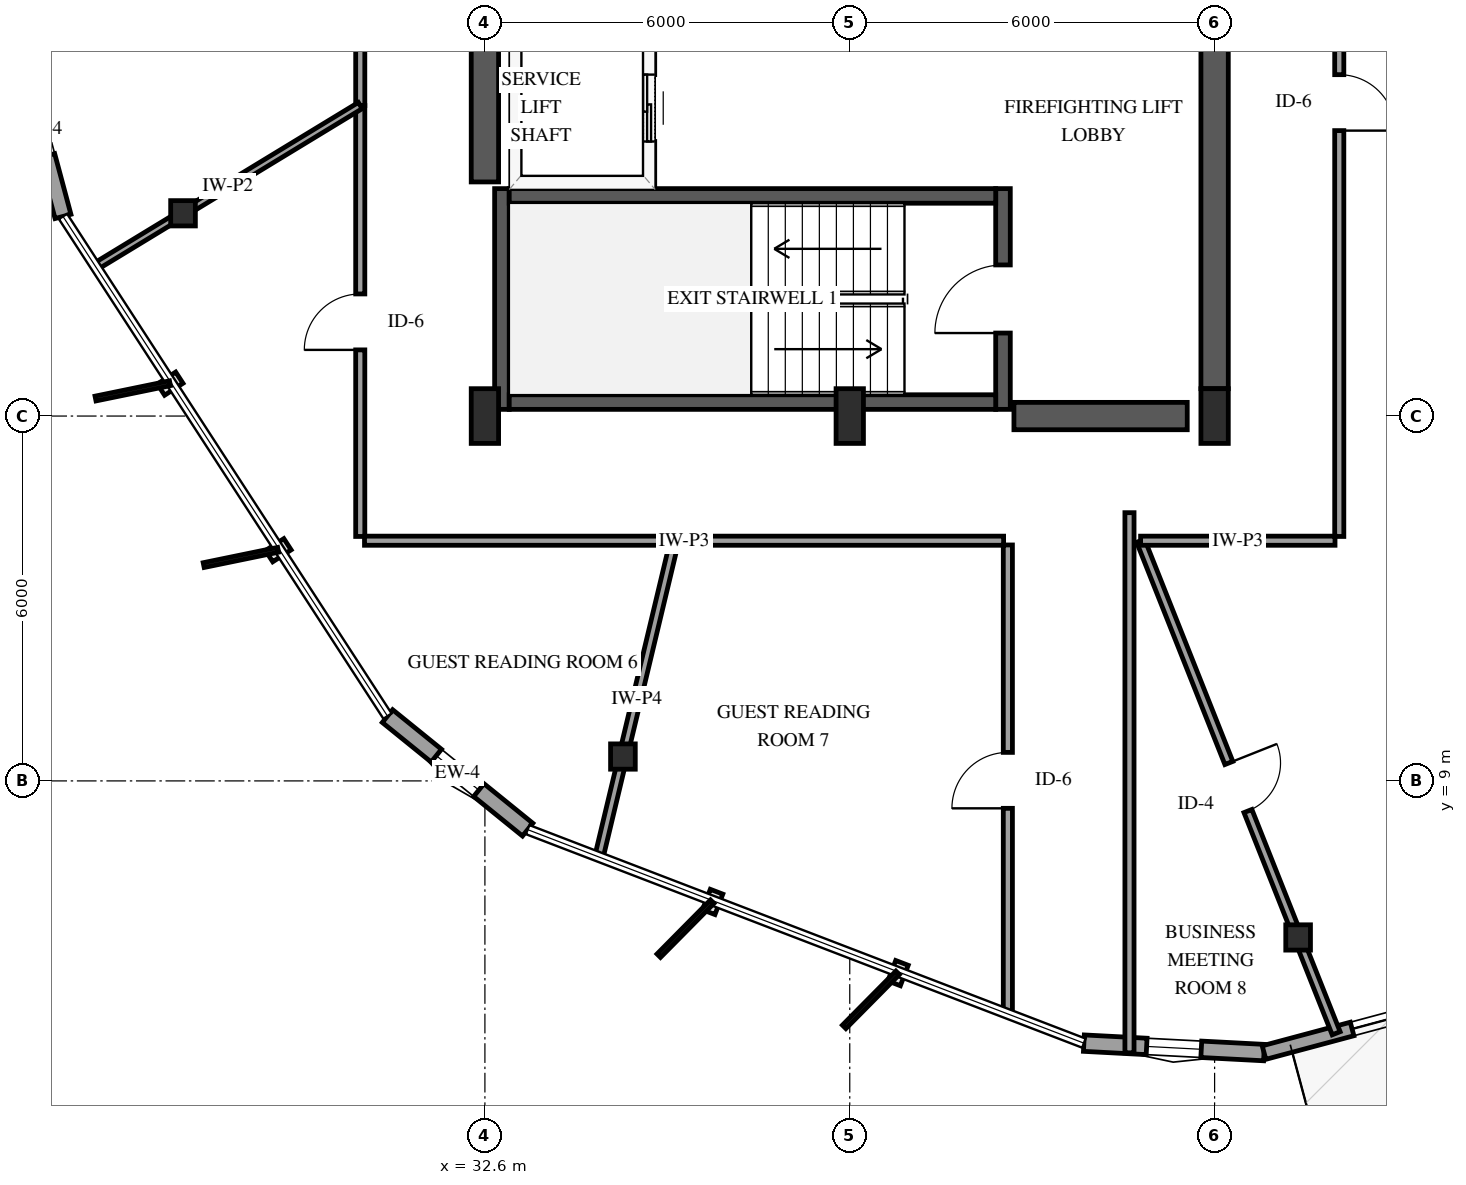
"""IFC4 building model, lengths in metres.
Left out: names, types, materials, properties, quantities, classifications, styles, units other than length and angle.
Written with IfcOpenShell. Run it as: python <this file> out.ifc"""

import sys

from ifc_helpers import new_model, si_unit, direction, frame, frame_2d, origin, origin_2d, place, context, subcontext, project, spatial, rectangle, i_section, extrude, element, fill, save


model = new_model("IFC4")
c1 = context("Model", 3, precision=1e-05, world=origin(), true_north=direction((0.0, 1.0)))
c2 = subcontext(c1, "Body", "Model", "MODEL_VIEW")
j1 = project(units=[si_unit("LENGTHUNIT", "METRE"), si_unit("PLANEANGLEUNIT", "RADIAN")], contexts=[c1])
p1 = place(None, origin())
s1 = spatial("IfcSite", under=j1, at=p1, CompositionType="ELEMENT")
p2 = place(p1, origin())
s2 = spatial("IfcBuilding", under=s1, at=p2, CompositionType="ELEMENT")
p3 = place(p2, frame((0.0, 0.0, 219.4)))
s3 = spatial("IfcBuildingStorey", under=s2, at=p3, CompositionType="ELEMENT", Elevation=219.4)
p4 = place(p3, frame((32.88, 15.11, 0.0), z_axis=(0.0, 0.0, 1.0), x_axis=(0.0, 1.0, 0.0)))
e1 = element("IfcWall", 1, at=p4, inside=s3, PredefinedType="SHEAR", context=c2, shape_type="SweptSolid", body=[
    extrude(rectangle(XDim=3.63, YDim=0.24, at=frame_2d((1.815, 0.0))), origin(), (0.0, 0.0, 1.0), 3.6),
])
p5 = place(p3, frame((41.12, 15.11, 0.0), z_axis=(0.0, 0.0, 1.0), x_axis=(0.0, 1.0, 0.0)))
e2 = element("IfcWall", 2, at=p5, inside=s3, PredefinedType="SHEAR", context=c2, shape_type="SweptSolid", body=[
    extrude(rectangle(XDim=3.63, YDim=0.24, at=frame_2d((1.815, 0.0))), origin(), (0.0, 0.0, 1.0), 3.6),
])
p6 = place(p5, frame((1.255, 0.0, 0.0)))
e3 = element("IfcOpeningElement", 3, at=p6, cuts=e2, PredefinedType="OPENING", context=c2, shape_type="SweptSolid", body=[
    extrude(rectangle(XDim=1.12, YDim=2.15, at=frame_2d((0.56, 1.075))), frame((0.0, 0.13, 0.0), z_axis=(0.0, -1.0, 0.0), x_axis=(1.0, 0.0, 0.0)), (0.0, 0.0, 1.0), 0.26),
])
for number, where, z_axis, x_axis in (
    (4, (33.0, 15.23, 0.0), (0.0, 0.0, 1.0), (1.0, 0.0, 0.0)),
    (5, (33.0, 18.62, 0.0), (0.0, 0.0, 1.0), (1.0, 0.0, 0.0)),
):
    element("IfcWall", number, at=place(p3, frame(where, z_axis=z_axis, x_axis=x_axis)), inside=s3, PredefinedType="SHEAR", context=c2, shape_type="SweptSolid", body=[
        extrude(rectangle(XDim=8.0, YDim=0.24, at=frame_2d((4.0, 0.0))), origin(), (0.0, 0.0, 1.0), 3.6),
    ])
p7 = place(p3, frame((32.6, 18.85, 0.0), z_axis=(0.0, 0.0, 1.0), x_axis=(0.0, 1.0, 0.0)))
e6 = element("IfcWall", 6, at=p7, inside=s3, PredefinedType="SHEAR", context=c2, shape_type="SweptSolid", body=[
    extrude(rectangle(XDim=12.3, YDim=0.45, at=frame_2d((6.15, 0.0))), origin(), (0.0, 0.0, 1.0), 3.6),
])
p8 = place(p3, frame((41.3, 15.0, 0.0), z_axis=(0.0, 0.0, 1.0), x_axis=(1.0, 0.0, 0.0)))
e7 = element("IfcWall", 7, at=p8, inside=s3, PredefinedType="SHEAR", context=c2, shape_type="SweptSolid", body=[
    extrude(rectangle(XDim=2.85, YDim=0.45, at=frame_2d((1.425, 0.0))), origin(), (0.0, 0.0, 1.0), 3.6),
])
p9 = place(p3, frame((44.6, 15.45, 0.0), z_axis=(0.0, 0.0, 1.0), x_axis=(0.0, 1.0, 0.0)))
e8 = element("IfcWall", 8, at=p9, inside=s3, PredefinedType="SHEAR", context=c2, shape_type="SweptSolid", body=[
    extrude(rectangle(XDim=6.35, YDim=0.45, at=frame_2d((3.175, 0.0))), origin(), (0.0, 0.0, 1.0), 3.6),
])
for number, where, z_axis, x_axis in (
    (9, (32.6, 15.0, 0.0), (0.0, 0.0, 1.0), (1.0, 0.0, 0.0)),
    (10, (38.6, 15.0, 0.0), (0.0, 0.0, 1.0), (1.0, 0.0, 0.0)),
    (11, (44.6, 15.0, 0.0), (0.0, 0.0, 1.0), (1.0, 0.0, 0.0)),
):
    element("IfcColumn", number, at=place(p3, frame(where, z_axis=z_axis, x_axis=x_axis)), inside=s3, PredefinedType="PILASTER", context=c2, shape_type="SweptSolid", body=[
        extrude(rectangle(XDim=0.45, YDim=0.9, at=origin_2d()), origin(), (0.0, 0.0, 1.0), 3.6),
    ])
for number, where, z_axis, x_axis in (
    (12, (27.635, 18.334, 0.0), (0.0, 0.0, 1.0), (1.0, 0.0, 0.0)),
    (13, (34.87, 9.401, 0.0), (0.0, 0.0, 1.0), (1.0, 0.0, 0.0)),
    (14, (45.973, 6.426, 0.0), (0.0, 0.0, 1.0), (1.0, 0.0, 0.0)),
):
    element("IfcColumn", number, at=place(p3, frame(where, z_axis=z_axis, x_axis=x_axis)), inside=s3, PredefinedType="COLUMN", context=c2, shape_type="SweptSolid", body=[
        extrude(i_section(OverallWidth=0.406, OverallDepth=0.416, WebThickness=0.03, FlangeThickness=0.048, FilletRadius=0.038, at=origin_2d()), origin(), (0.0, 0.0, 1.0), 3.6),
    ])
p10 = place(p3, frame((24.894, 21.148, 0.0), z_axis=(0.0, 0.0, 1.0), x_axis=(0.258825213075, -0.965924173565, 0.0)))
e15 = element("IfcWall", 15, at=p10, inside=s3, PredefinedType="SOLIDWALL", context=c2, shape_type="SweptSolid", body=[
    extrude(rectangle(XDim=2.967, YDim=0.27, at=frame_2d((1.483, 0.0))), origin(), (0.0, 0.0, 1.0), 2.679),
])
p11 = place(p10, frame((1.033, 0.0, 0.75)))
e16 = element("IfcOpeningElement", 16, at=p11, cuts=e15, PredefinedType="OPENING", context=c2, shape_type="SweptSolid", body=[
    extrude(rectangle(XDim=0.9, YDim=1.5, at=frame_2d((0.45, 0.75))), frame((0.0, 0.145, 0.0), z_axis=(0.0, -1.0, 0.0), x_axis=(1.0, 0.0, 0.0)), (0.0, 0.0, 1.0), 0.29),
])
p12 = place(p3, frame((30.998, 10.066, 0.0), z_axis=(0.0, 0.0, 1.0), x_axis=(0.777137534132, -0.629330797787, 0.0)))
e17 = element("IfcWall", 17, at=p12, inside=s3, PredefinedType="SOLIDWALL", context=c2, shape_type="SweptSolid", body=[
    extrude(rectangle(XDim=2.967, YDim=0.27, at=frame_2d((1.483, 0.0))), origin(), (0.0, 0.0, 1.0), 2.679),
])
p13 = place(p12, frame((1.033, 0.0, 0.75)))
e18 = element("IfcOpeningElement", 18, at=p13, cuts=e17, PredefinedType="OPENING", context=c2, shape_type="SweptSolid", body=[
    extrude(rectangle(XDim=0.9, YDim=1.5, at=frame_2d((0.45, 0.75))), frame((0.0, 0.145, 0.0), z_axis=(0.0, -1.0, 0.0), x_axis=(1.0, 0.0, 0.0)), (0.0, 0.0, 1.0), 0.29),
])
p14 = place(p3, frame((42.45, 4.688, 0.0), z_axis=(0.0, 0.0, 1.0), x_axis=(0.998629173391, -0.05234285102, 0.0)))
e19 = element("IfcWall", 19, at=p14, inside=s3, PredefinedType="SOLIDWALL", context=c2, shape_type="SweptSolid", body=[
    extrude(rectangle(XDim=2.967, YDim=0.27, at=frame_2d((1.483, 0.0))), origin(), (0.0, 0.0, 1.0), 2.679),
])
p15 = place(p14, frame((1.033, 0.0, 0.75)))
e20 = element("IfcOpeningElement", 20, at=p15, cuts=e19, PredefinedType="OPENING", context=c2, shape_type="SweptSolid", body=[
    extrude(rectangle(XDim=0.9, YDim=1.5, at=frame_2d((0.45, 0.75))), frame((0.0, 0.145, 0.0), z_axis=(0.0, -1.0, 0.0), x_axis=(1.0, 0.0, 0.0)), (0.0, 0.0, 1.0), 0.29),
])
p16 = place(p3, frame((45.413, 4.532, 0.0), z_axis=(0.0, 0.0, 1.0), x_axis=(0.965924471327, 0.258824101839, 0.0)))
e21 = element("IfcWall", 21, at=p16, inside=s3, PredefinedType="SOLIDWALL", context=c2, shape_type="SweptSolid", body=[
    extrude(rectangle(XDim=9.798, YDim=0.23, at=frame_2d((4.899, 0.0))), origin(), (0.0, 0.0, 1.0), 2.679),
])
p17 = place(p16, frame((4.399, 0.0, 0.0)))
e22 = element("IfcOpeningElement", 22, at=p17, cuts=e21, PredefinedType="OPENING", context=c2, shape_type="SweptSolid", body=[
    extrude(rectangle(XDim=1.0, YDim=2.15, at=frame_2d((0.5, 1.075))), frame((0.0, 0.125, 0.0), z_axis=(0.0, -1.0, 0.0), x_axis=(1.0, 0.0, 0.0)), (0.0, 0.0, 1.0), 0.25),
])
p18 = place(p16, frame((1.5, 0.0, 0.72)))
e23 = element("IfcOpeningElement", 23, at=p18, cuts=e21, PredefinedType="OPENING", context=c2, shape_type="SweptSolid", body=[
    extrude(rectangle(XDim=1.2, YDim=1.6, at=frame_2d((0.6, 0.8))), frame((0.0, 0.125, 0.0), z_axis=(0.0, -1.0, 0.0), x_axis=(1.0, 0.0, 0.0)), (0.0, 0.0, 1.0), 0.25),
])
p19 = place(p16, frame((6.039, 0.0, 0.72)))
e24 = element("IfcOpeningElement", 24, at=p19, cuts=e21, PredefinedType="OPENING", context=c2, shape_type="SweptSolid", body=[
    extrude(rectangle(XDim=1.2, YDim=1.6, at=frame_2d((0.6, 0.8))), frame((0.0, 0.125, 0.0), z_axis=(0.0, -1.0, 0.0), x_axis=(1.0, 0.0, 0.0)), (0.0, 0.0, 1.0), 0.25),
])
p20 = place(p3, frame((35.3, 18.79, 0.0), z_axis=(0.0, 0.0, 1.0), x_axis=(0.0, 1.0, 0.0)))
e25 = element("IfcWall", 25, at=p20, inside=s3, PredefinedType="SOLIDWALL", context=c2, shape_type="SweptSolid", body=[
    extrude(rectangle(XDim=2.55, YDim=0.185, at=frame_2d((1.275, 0.0))), origin(), (0.0, 0.0, 1.0), 3.3),
])
p21 = place(p20, frame((0.725, 0.0, 0.0)))
e26 = element("IfcOpeningElement", 26, at=p21, cuts=e25, PredefinedType="OPENING", context=c2, shape_type="SweptSolid", body=[
    extrude(rectangle(XDim=1.1, YDim=2.15, at=frame_2d((0.55, 1.075))), frame((0.0, 0.103, 0.0), z_axis=(0.0, -1.0, 0.0), x_axis=(1.0, 0.0, 0.0)), (0.0, 0.0, 1.0), 0.205),
])
p22 = place(p3, frame((46.65, 27.258, 0.0), z_axis=(0.0, 0.0, 1.0), x_axis=(0.0, -1.0, 0.0)))
e27 = element("IfcWall", 27, at=p22, inside=s3, PredefinedType="PARTITIONING", context=c2, shape_type="SweptSolid", body=[
    extrude(rectangle(XDim=14.238, YDim=0.15, at=frame_2d((7.119, 0.0))), origin(), (0.0, 0.0, 1.0), 3.3),
])
p23 = place(p22, frame((6.644, 0.0, 0.0)))
e28 = element("IfcOpeningElement", 28, at=p23, cuts=e27, PredefinedType="OPENING", context=c2, shape_type="SweptSolid", body=[
    extrude(rectangle(XDim=0.92, YDim=2.12, at=frame_2d((0.46, 1.06))), frame((0.0, 0.085, 0.0), z_axis=(0.0, -1.0, 0.0), x_axis=(1.0, 0.0, 0.0)), (0.0, 0.0, 1.0), 0.17),
])
p24 = place(p3, frame((43.383, 12.95, 0.0), z_axis=(0.0, 0.0, 1.0), x_axis=(0.369027609924, -0.929418432738, 0.0)))
e29 = element("IfcWall", 29, at=p24, inside=s3, PredefinedType="PARTITIONING", context=c2, shape_type="SweptSolid", body=[
    extrude(rectangle(XDim=8.715, YDim=0.14, at=frame_2d((4.357, 0.0))), origin(), (0.0, 0.0, 1.0), 2.595),
])
p25 = place(p24, frame((3.933, 0.0, 0.0)))
e30 = element("IfcOpeningElement", 30, at=p25, cuts=e29, PredefinedType="OPENING", context=c2, shape_type="SweptSolid", body=[
    extrude(rectangle(XDim=0.85, YDim=2.1, at=frame_2d((0.425, 1.05))), frame((0.0, 0.08, 0.0), z_axis=(0.0, -1.0, 0.0), x_axis=(1.0, 0.0, 0.0)), (0.0, 0.0, 1.0), 0.16),
])
p26 = place(p3, frame((30.55, 20.106, 0.0), z_axis=(0.0, 0.0, 1.0), x_axis=(0.0, 1.0, 0.0)))
e31 = element("IfcWall", 31, at=p26, inside=s3, PredefinedType="PARTITIONING", context=c2, shape_type="SweptSolid", body=[
    extrude(rectangle(XDim=8.245, YDim=0.15, at=frame_2d((4.123, 0.0))), origin(), (0.0, 0.0, 1.0), 3.3),
])
p27 = place(p26, frame((3.647, 0.0, 0.0)))
e32 = element("IfcOpeningElement", 32, at=p27, cuts=e31, PredefinedType="OPENING", context=c2, shape_type="SweptSolid", body=[
    extrude(rectangle(XDim=0.92, YDim=2.12, at=frame_2d((0.46, 1.06))), frame((0.0, 0.085, 0.0), z_axis=(0.0, -1.0, 0.0), x_axis=(1.0, 0.0, 0.0)), (0.0, 0.0, 1.0), 0.17),
])
p28 = place(p3, frame((41.2, 5.167, 0.0), z_axis=(0.0, 0.0, 1.0), x_axis=(0.0, 1.0, 0.0)))
e33 = element("IfcWall", 33, at=p28, inside=s3, PredefinedType="PARTITIONING", context=c2, shape_type="SweptSolid", body=[
    extrude(rectangle(XDim=7.713, YDim=0.15, at=frame_2d((3.856, 0.0))), origin(), (0.0, 0.0, 1.0), 3.3),
])
p29 = place(p28, frame((3.382, 0.0, 0.0)))
e34 = element("IfcOpeningElement", 34, at=p29, cuts=e33, PredefinedType="OPENING", context=c2, shape_type="SweptSolid", body=[
    extrude(rectangle(XDim=0.92, YDim=2.12, at=frame_2d((0.46, 1.06))), frame((0.0, 0.085, 0.0), z_axis=(0.0, -1.0, 0.0), x_axis=(1.0, 0.0, 0.0)), (0.0, 0.0, 1.0), 0.17),
])
p30 = place(p3, frame((30.55, 13.02, 0.0), z_axis=(0.0, 0.0, 1.0), x_axis=(0.0, 1.0, 0.0)))
e35 = element("IfcWall", 35, at=p30, inside=s3, PredefinedType="PARTITIONING", context=c2, shape_type="SweptSolid", body=[
    extrude(rectangle(XDim=7.086, YDim=0.15, at=frame_2d((3.543, 0.0))), origin(), (0.0, 0.0, 1.0), 3.3),
])
p31 = place(p30, frame((3.068, 0.0, 0.0)))
e36 = element("IfcOpeningElement", 36, at=p31, cuts=e35, PredefinedType="OPENING", context=c2, shape_type="SweptSolid", body=[
    extrude(rectangle(XDim=0.92, YDim=2.12, at=frame_2d((0.46, 1.06))), frame((0.0, 0.085, 0.0), z_axis=(0.0, -1.0, 0.0), x_axis=(1.0, 0.0, 0.0)), (0.0, 0.0, 1.0), 0.17),
])
p32 = place(p3, frame((41.13, 12.95, 0.0), z_axis=(0.0, 0.0, 1.0), x_axis=(-1.0, 0.0, 0.0)))
e37 = element("IfcWall", 37, at=p32, inside=s3, PredefinedType="PARTITIONING", context=c2, shape_type="SweptSolid", body=[
    extrude(rectangle(XDim=5.411, YDim=0.15, at=frame_2d((2.706, 0.0))), origin(), (0.0, 0.0, 1.0), 3.3),
])
p33 = place(p3, frame((35.719, 12.95, 0.0), z_axis=(0.0, 0.0, 1.0), x_axis=(-0.232607948604, -0.972570584712, 0.0)))
e38 = element("IfcWall", 38, at=p33, inside=s3, PredefinedType="PARTITIONING", context=c2, shape_type="SweptSolid", body=[
    extrude(rectangle(XDim=5.348, YDim=0.14, at=frame_2d((2.674, 0.0))), origin(), (0.0, 0.0, 1.0), 2.595),
])
p34 = place(p3, frame((35.719, 12.95, 0.0), z_axis=(0.0, 0.0, 1.0), x_axis=(-1.0, 0.0, 0.0)))
e39 = element("IfcWall", 39, at=p34, inside=s3, PredefinedType="PARTITIONING", context=c2, shape_type="SweptSolid", body=[
    extrude(rectangle(XDim=5.099, YDim=0.15, at=frame_2d((2.549, 0.0))), origin(), (0.0, 0.0, 1.0), 3.3),
])
p35 = place(p3, frame((30.55, 20.106, 0.0), z_axis=(0.0, 0.0, 1.0), x_axis=(-0.854485244393, -0.519475665566, 0.0)))
e40 = element("IfcWall", 40, at=p35, inside=s3, PredefinedType="PARTITIONING", context=c2, shape_type="SweptSolid", body=[
    extrude(rectangle(XDim=5.095, YDim=0.12, at=frame_2d((2.548, 0.0))), origin(), (0.0, 0.0, 1.0), 2.678),
])
p36 = place(p3, frame((46.58, 12.95, 0.0), z_axis=(0.0, 0.0, 1.0), x_axis=(-1.0, 0.0, 0.0)))
e41 = element("IfcWall", 41, at=p36, inside=s3, PredefinedType="PARTITIONING", context=c2, shape_type="SweptSolid", body=[
    extrude(rectangle(XDim=3.197, YDim=0.15, at=frame_2d((1.599, 0.0))), origin(), (0.0, 0.0, 1.0), 3.3),
])
p37 = place(p3, frame((43.2, 13.411, 0.0), z_axis=(0.0, 0.0, 1.0), x_axis=(0.0, -1.0, 0.0)))
e42 = element("IfcWall", 42, at=p37, inside=s3, PredefinedType="PARTITIONING", context=c2, shape_type="SweptSolid", body=[
    extrude(rectangle(XDim=8.883, YDim=0.15, at=frame_2d((4.441, 0.0))), origin(), (0.0, 0.0, 1.0), 3.3),
])
p38 = place(p13, origin())
e43 = element("IfcWindow", 43, at=p38, inside=s3, PartitioningType="SINGLE_PANEL", PredefinedType="WINDOW", context=c2, shape_type="SweptSolid", body=[
    extrude(rectangle(XDim=0.9, YDim=1.5, at=frame_2d((0.45, 0.75))), frame((0.0, 0.03, 0.0), z_axis=(0.0, -1.0, 0.0), x_axis=(1.0, 0.0, 0.0)), (0.0, 0.0, 1.0), 0.06),
])
fill(e18, e43)
p39 = place(p15, origin())
e44 = element("IfcWindow", 44, at=p39, inside=s3, PartitioningType="SINGLE_PANEL", PredefinedType="WINDOW", context=c2, shape_type="SweptSolid", body=[
    extrude(rectangle(XDim=0.9, YDim=1.5, at=frame_2d((0.45, 0.75))), frame((0.0, 0.03, 0.0), z_axis=(0.0, -1.0, 0.0), x_axis=(1.0, 0.0, 0.0)), (0.0, 0.0, 1.0), 0.06),
])
fill(e20, e44)
p40 = place(p18, origin())
e45 = element("IfcWindow", 45, at=p40, inside=s3, PartitioningType="SINGLE_PANEL", PredefinedType="WINDOW", context=c2, shape_type="SweptSolid", body=[
    extrude(rectangle(XDim=1.2, YDim=1.6, at=frame_2d((0.6, 0.8))), frame((0.0, 0.03, 0.0), z_axis=(0.0, -1.0, 0.0), x_axis=(1.0, 0.0, 0.0)), (0.0, 0.0, 1.0), 0.06),
])
fill(e23, e45)
p41 = place(p21, origin())
e46 = element("IfcDoor", 46, at=p41, inside=s3, OperationType="SLIDING_TO_LEFT", PredefinedType="DOOR", context=c2, shape_type="SweptSolid", body=[
    extrude(rectangle(XDim=1.1, YDim=2.15, at=frame_2d((0.55, 1.075))), frame((0.0, 0.025, 0.0), z_axis=(0.0, -1.0, 0.0), x_axis=(1.0, 0.0, 0.0)), (0.0, 0.0, 1.0), 0.05),
])
fill(e26, e46)
p42 = place(p6, origin())
e47 = element("IfcDoor", 47, at=p42, inside=s3, OperationType="SINGLE_SWING_LEFT", PredefinedType="DOOR", context=c2, shape_type="SweptSolid", body=[
    extrude(rectangle(XDim=1.12, YDim=2.15, at=frame_2d((0.56, 1.075))), frame((0.0, 0.025, 0.0), z_axis=(0.0, -1.0, 0.0), x_axis=(1.0, 0.0, 0.0)), (0.0, 0.0, 1.0), 0.05),
])
fill(e3, e47)
p43 = place(p23, origin())
e48 = element("IfcDoor", 48, at=p43, inside=s3, OperationType="SINGLE_SWING_RIGHT", PredefinedType="DOOR", context=c2, shape_type="SweptSolid", body=[
    extrude(rectangle(XDim=0.92, YDim=2.12, at=frame_2d((0.46, 1.06))), frame((0.0, 0.025, 0.0), z_axis=(0.0, -1.0, 0.0), x_axis=(1.0, 0.0, 0.0)), (0.0, 0.0, 1.0), 0.05),
])
fill(e28, e48)
p44 = place(p25, origin())
e49 = element("IfcDoor", 49, at=p44, inside=s3, OperationType="SINGLE_SWING_LEFT", PredefinedType="DOOR", context=c2, shape_type="SweptSolid", body=[
    extrude(rectangle(XDim=0.85, YDim=2.1, at=frame_2d((0.425, 1.05))), frame((0.0, 0.025, 0.0), z_axis=(0.0, -1.0, 0.0), x_axis=(1.0, 0.0, 0.0)), (0.0, 0.0, 1.0), 0.05),
])
fill(e30, e49)
p45 = place(p29, origin())
e50 = element("IfcDoor", 50, at=p45, inside=s3, OperationType="SINGLE_SWING_LEFT", PredefinedType="DOOR", context=c2, shape_type="SweptSolid", body=[
    extrude(rectangle(XDim=0.92, YDim=2.12, at=frame_2d((0.46, 1.06))), frame((0.0, 0.025, 0.0), z_axis=(0.0, -1.0, 0.0), x_axis=(1.0, 0.0, 0.0)), (0.0, 0.0, 1.0), 0.05),
])
fill(e34, e50)
p46 = place(p31, origin())
e51 = element("IfcDoor", 51, at=p46, inside=s3, OperationType="SINGLE_SWING_LEFT", PredefinedType="DOOR", context=c2, shape_type="SweptSolid", body=[
    extrude(rectangle(XDim=0.92, YDim=2.12, at=frame_2d((0.46, 1.06))), frame((0.0, 0.025, 0.0), z_axis=(0.0, -1.0, 0.0), x_axis=(1.0, 0.0, 0.0)), (0.0, 0.0, 1.0), 0.05),
])
fill(e36, e51)
save(model, sys.argv[1])
